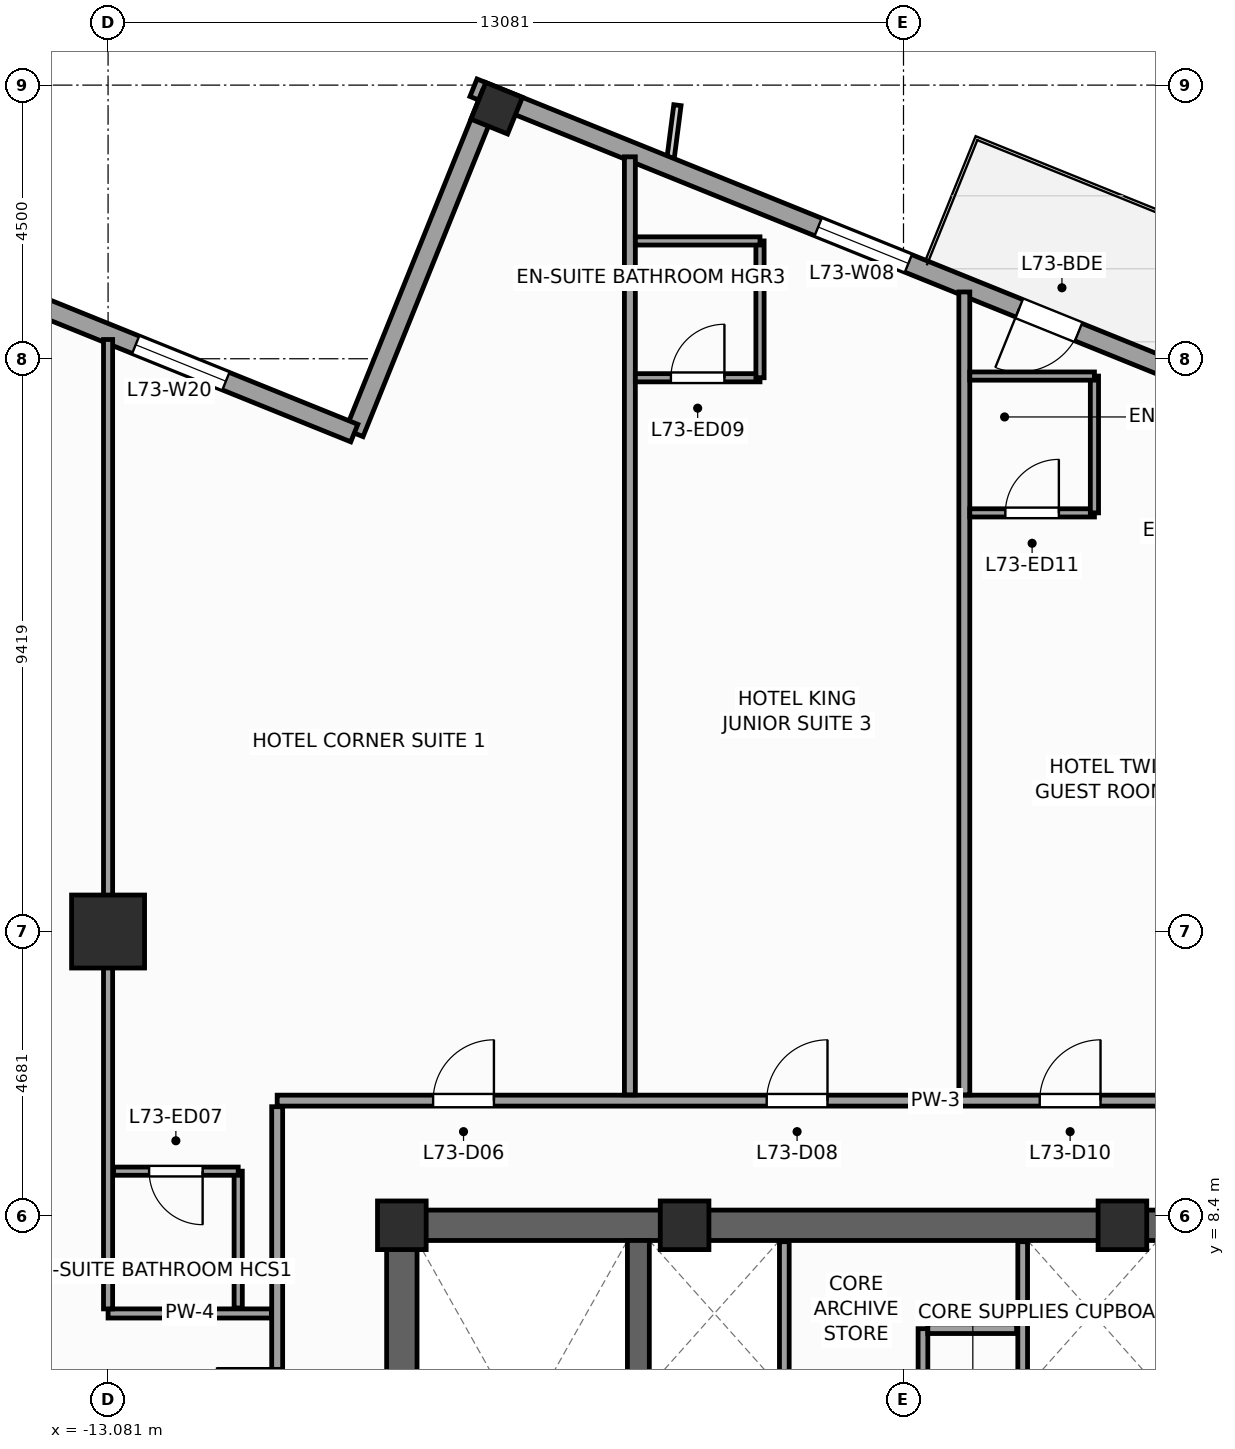
"""IFC4 building model, lengths in metres.
Left out: names, types, materials, properties, quantities, classifications, styles, units other than length and angle.
Written with IfcOpenShell. Run it as: python <this file> out.ifc"""

import sys

from ifc_helpers import new_model, si_unit, direction, frame, frame_2d, origin, origin_2d, place, context, subcontext, project, spatial, rectangle, extrude, source, transform, mapped, element, fill, save


model = new_model("IFC4")
c1 = context("Model", 3, precision=1e-05, world=origin(), true_north=direction((0.0, 1.0)))
c2 = subcontext(c1, "Body", "Model", "MODEL_VIEW")
j1 = project(units=[si_unit("LENGTHUNIT", "METRE"), si_unit("PLANEANGLEUNIT", "RADIAN")], contexts=[c1])
p1 = place(None, origin())
s1 = spatial("IfcSite", under=j1, at=p1, CompositionType="ELEMENT")
p2 = place(p1, origin())
s2 = spatial("IfcBuilding", under=s1, at=p2, CompositionType="ELEMENT")
p3 = place(p2, frame((0.0, 0.0, 297.6)))
s3 = spatial("IfcBuildingStorey", under=s2, at=p3, CompositionType="ELEMENT", Elevation=297.6)
p4 = place(p3, frame((-8.5, 8.25, 0.0), z_axis=(0.0, 0.0, 1.0), x_axis=(1.0, 0.0, 0.0)))
e1 = element("IfcWall", 1, at=p4, inside=s3, PredefinedType="SHEAR", context=c2, shape_type="SweptSolid", body=[
    extrude(rectangle(XDim=17.0, YDim=0.5, at=frame_2d((8.5, 0.0))), origin(), (0.0, 0.0, 1.0), 3.6),
])
p5 = place(p3, frame((-8.25, -8.0, 0.0), z_axis=(0.0, 0.0, 1.0), x_axis=(0.0, 1.0, 0.0)))
e2 = element("IfcWall", 2, at=p5, inside=s3, PredefinedType="SHEAR", context=c2, shape_type="SweptSolid", body=[
    extrude(rectangle(XDim=16.0, YDim=0.5, at=frame_2d((8.0, 0.0))), origin(), (0.0, 0.0, 1.0), 3.6),
])
p6 = place(p5, frame((4.69, 0.0, 0.0)))
e3 = element("IfcOpeningElement", 3, at=p6, cuts=e2, PredefinedType="OPENING", context=c2, shape_type="SweptSolid", body=[
    extrude(rectangle(XDim=1.3, YDim=2.2, at=frame_2d((0.65, 1.1))), frame((0.0, 0.26, 0.0), z_axis=(0.0, -1.0, 0.0), x_axis=(1.0, 0.0, 0.0)), (0.0, 0.0, 1.0), 0.52),
])
p7 = place(p3, frame((-4.36, -8.0, 0.0), z_axis=(0.0, 0.0, 1.0), x_axis=(0.0, 1.0, 0.0)))
e4 = element("IfcWall", 4, at=p7, inside=s3, PredefinedType="SHEAR", context=c2, shape_type="SweptSolid", body=[
    extrude(rectangle(XDim=16.0, YDim=0.36, at=frame_2d((8.0, 0.0))), origin(), (0.0, 0.0, 1.0), 3.6),
])
m1 = source(origin(), c2, "Body", "SweptSolid", [
    extrude(rectangle(XDim=0.8, YDim=0.8, at=origin_2d()), origin(), (0.0, 0.0, 1.0), 3.6),
])
for number, where, z_axis, x_axis in (
    (5, (-8.25, 8.25, 0.0), (0.0, 0.0, 1.0), (1.0, 0.0, 0.0)),
    (6, (-3.6, 8.25, 0.0), (0.0, 0.0, 1.0), (1.0, 0.0, 0.0)),
    (7, (3.6, 8.25, 0.0), (0.0, 0.0, 1.0), (1.0, 0.0, 0.0)),
):
    element("IfcColumn", number, at=place(p3, frame(where, z_axis=z_axis, x_axis=x_axis)), inside=s3, PredefinedType="PILASTER", context=c2, shape_type="MappedRepresentation", body=[
        mapped(m1, transform((0.0, 0.0, 0.0), scale=1.0)),
    ])
m2 = source(origin(), c2, "Body", "SweptSolid", [
    extrude(rectangle(XDim=1.2, YDim=1.2, at=origin_2d()), origin(), (0.0, 0.0, 1.0), 3.6),
])
p8 = place(p3, frame((-13.081, 13.081, 0.0), z_axis=(0.0, 0.0, 1.0), x_axis=(1.0, 0.0, 0.0)))
e8 = element("IfcColumn", 8, at=p8, inside=s3, PredefinedType="COLUMN", context=c2, shape_type="MappedRepresentation", body=[
    mapped(m2, transform((0.0, 0.0, 0.0), scale=1.0)),
])
m3 = source(origin(), c2, "Body", "SweptSolid", [
    extrude(rectangle(XDim=0.65, YDim=0.65, at=origin_2d()), origin(), (0.0, 0.0, 1.0), 3.6),
])
p9 = place(p3, frame((-6.69, 26.62, 0.0), z_axis=(0.0, 0.0, 1.0), x_axis=(0.374606593416, 0.927183854567, 0.0)))
e9 = element("IfcColumn", 9, at=p9, inside=s3, PredefinedType="COLUMN", context=c2, shape_type="MappedRepresentation", body=[
    mapped(m3, transform((0.0, 0.0, 0.0), scale=1.0)),
])
p10 = place(p3, frame((23.813, 14.479, 0.0), z_axis=(0.0, 0.0, 1.0), x_axis=(-0.927182657188, 0.374609557019, 0.0)))
e10 = element("IfcWall", 10, at=p10, inside=s3, PredefinedType="STANDARD", context=c2, shape_type="SweptSolid", body=[
    extrude(rectangle(XDim=33.31, YDim=0.31, at=frame_2d((16.655, 0.0))), origin(), (0.0, 0.0, 1.0), 2.75),
])
p11 = place(p10, frame((22.58, 0.0, 0.0)))
e11 = element("IfcOpeningElement", 11, at=p11, cuts=e10, PredefinedType="OPENING", context=c2, shape_type="SweptSolid", body=[
    extrude(rectangle(XDim=1.05, YDim=2.25, at=frame_2d((0.525, 1.125))), frame((0.0, 0.165, 0.0), z_axis=(0.0, -1.0, 0.0), x_axis=(1.0, 0.0, 0.0)), (0.0, 0.0, 1.0), 0.33),
])
p12 = place(p10, frame((3.197, 0.0, 0.47)))
e12 = element("IfcOpeningElement", 12, at=p12, cuts=e10, PredefinedType="OPENING", context=c2, shape_type="SweptSolid", body=[
    extrude(rectangle(XDim=1.6, YDim=2.1, at=frame_2d((0.8, 1.05))), frame((0.0, 0.165, 0.0), z_axis=(0.0, -1.0, 0.0), x_axis=(1.0, 0.0, 0.0)), (0.0, 0.0, 1.0), 0.33),
])
p13 = place(p10, frame((8.86, 0.0, 0.47)))
e13 = element("IfcOpeningElement", 13, at=p13, cuts=e10, PredefinedType="OPENING", context=c2, shape_type="SweptSolid", body=[
    extrude(rectangle(XDim=1.6, YDim=2.1, at=frame_2d((0.8, 1.05))), frame((0.0, 0.165, 0.0), z_axis=(0.0, -1.0, 0.0), x_axis=(1.0, 0.0, 0.0)), (0.0, 0.0, 1.0), 0.33),
])
p14 = place(p10, frame((14.439, 0.0, 0.47)))
e14 = element("IfcOpeningElement", 14, at=p14, cuts=e10, PredefinedType="OPENING", context=c2, shape_type="SweptSolid", body=[
    extrude(rectangle(XDim=1.6, YDim=2.1, at=frame_2d((0.8, 1.05))), frame((0.0, 0.165, 0.0), z_axis=(0.0, -1.0, 0.0), x_axis=(1.0, 0.0, 0.0)), (0.0, 0.0, 1.0), 0.33),
])
p15 = place(p10, frame((25.597, 0.0, 0.47)))
e15 = element("IfcOpeningElement", 15, at=p15, cuts=e10, PredefinedType="OPENING", context=c2, shape_type="SweptSolid", body=[
    extrude(rectangle(XDim=1.6, YDim=2.1, at=frame_2d((0.8, 1.05))), frame((0.0, 0.165, 0.0), z_axis=(0.0, -1.0, 0.0), x_axis=(1.0, 0.0, 0.0)), (0.0, 0.0, 1.0), 0.33),
])
p16 = place(p3, frame((-6.784, 26.841, 0.0), z_axis=(0.0, 0.0, 1.0), x_axis=(-0.374636620962, -0.927171722085, 0.0)))
e16 = element("IfcWall", 16, at=p16, inside=s3, PredefinedType="STANDARD", context=c2, shape_type="SweptSolid", body=[
    extrude(rectangle(XDim=6.0, YDim=0.31, at=frame_2d((3.0, 0.0))), origin(), (0.0, 0.0, 1.0), 2.65),
])
p17 = place(p3, frame((-9.032, 21.278, 0.0), z_axis=(0.0, 0.0, 1.0), x_axis=(-0.927185411764, 0.374602739196, 0.0)))
e17 = element("IfcWall", 17, at=p17, inside=s3, PredefinedType="STANDARD", context=c2, shape_type="SweptSolid", body=[
    extrude(rectangle(XDim=6.155, YDim=0.31, at=frame_2d((3.078, 0.0))), origin(), (0.0, 0.0, 1.0), 3.35),
])
p18 = place(p17, frame((2.278, 0.0, 0.47)))
e18 = element("IfcOpeningElement", 18, at=p18, cuts=e17, PredefinedType="OPENING", context=c2, shape_type="SweptSolid", body=[
    extrude(rectangle(XDim=1.6, YDim=2.1, at=frame_2d((0.8, 1.05))), frame((0.0, 0.165, 0.0), z_axis=(0.0, -1.0, 0.0), x_axis=(1.0, 0.0, 0.0)), (0.0, 0.0, 1.0), 0.33),
])
for number, where, z_axis, x_axis in (
    (19, (-1.96, 4.58, 0.0), (0.0, 0.0, 1.0), (0.0, 1.0, 0.0)),
    (20, (1.96, 4.58, 0.0), (0.0, 0.0, 1.0), (0.0, 1.0, 0.0)),
):
    element("IfcWall", number, at=place(p3, frame(where, z_axis=z_axis, x_axis=x_axis)), inside=s3, PredefinedType="PARTITIONING", context=c2, shape_type="SweptSolid", body=[
        extrude(rectangle(XDim=3.4, YDim=0.16, at=frame_2d((1.7, 0.0))), origin(), (0.0, 0.0, 1.0), 3.35),
    ])
p19 = place(p3, frame((0.32, 4.6, 0.0), z_axis=(0.0, 0.0, 1.0), x_axis=(0.0, 1.0, 0.0)))
e21 = element("IfcWall", 21, at=p19, inside=s3, PredefinedType="PARTITIONING", context=c2, shape_type="SweptSolid", body=[
    extrude(rectangle(XDim=1.95, YDim=0.16, at=frame_2d((0.975, 0.0))), origin(), (0.0, 0.0, 1.0), 3.35),
])
p20 = place(p3, frame((0.4, 6.55, 0.0), z_axis=(0.0, 0.0, 1.0), x_axis=(1.0, 0.0, 0.0)))
e22 = element("IfcWall", 22, at=p20, inside=s3, PredefinedType="PARTITIONING", context=c2, shape_type="SweptSolid", body=[
    extrude(rectangle(XDim=1.46, YDim=0.16, at=frame_2d((0.73, 0.0))), origin(), (0.0, 0.0, 1.0), 3.35),
])
p21 = place(p3, frame((-10.3, 10.3, 0.0), z_axis=(0.0, 0.0, 1.0), x_axis=(1.0, 0.0, 0.0)))
e23 = element("IfcWall", 23, at=p21, inside=s3, PredefinedType="PARTITIONING", context=c2, shape_type="SweptSolid", body=[
    extrude(rectangle(XDim=21.65, YDim=0.18, at=frame_2d((10.825, 0.0))), origin(), (0.0, 0.0, 1.0), 3.35),
])
p22 = place(p21, frame((2.564, 0.0, 0.0)))
e24 = element("IfcOpeningElement", 24, at=p22, cuts=e23, PredefinedType="OPENING", context=c2, shape_type="SweptSolid", body=[
    extrude(rectangle(XDim=1.0, YDim=2.15, at=frame_2d((0.5, 1.075))), frame((0.0, 0.1, 0.0), z_axis=(0.0, -1.0, 0.0), x_axis=(1.0, 0.0, 0.0)), (0.0, 0.0, 1.0), 0.2),
])
p23 = place(p21, frame((8.05, 0.0, 0.0)))
e25 = element("IfcOpeningElement", 25, at=p23, cuts=e23, PredefinedType="OPENING", context=c2, shape_type="SweptSolid", body=[
    extrude(rectangle(XDim=1.0, YDim=2.15, at=frame_2d((0.5, 1.075))), frame((0.0, 0.1, 0.0), z_axis=(0.0, -1.0, 0.0), x_axis=(1.0, 0.0, 0.0)), (0.0, 0.0, 1.0), 0.2),
])
p24 = place(p21, frame((12.54, 0.0, 0.0)))
e26 = element("IfcOpeningElement", 26, at=p24, cuts=e23, PredefinedType="OPENING", context=c2, shape_type="SweptSolid", body=[
    extrude(rectangle(XDim=1.0, YDim=2.15, at=frame_2d((0.5, 1.075))), frame((0.0, 0.1, 0.0), z_axis=(0.0, -1.0, 0.0), x_axis=(1.0, 0.0, 0.0)), (0.0, 0.0, 1.0), 0.2),
])
p25 = place(p21, frame((18.871, 0.0, 0.0)))
e27 = element("IfcOpeningElement", 27, at=p25, cuts=e23, PredefinedType="OPENING", context=c2, shape_type="SweptSolid", body=[
    extrude(rectangle(XDim=1.0, YDim=2.15, at=frame_2d((0.5, 1.075))), frame((0.0, 0.1, 0.0), z_axis=(0.0, -1.0, 0.0), x_axis=(1.0, 0.0, 0.0)), (0.0, 0.0, 1.0), 0.2),
])
p26 = place(p3, frame((-10.3, -12.35, 0.0), z_axis=(0.0, 0.0, 1.0), x_axis=(0.0, 1.0, 0.0)))
e28 = element("IfcWall", 28, at=p26, inside=s3, PredefinedType="PARTITIONING", context=c2, shape_type="SweptSolid", body=[
    extrude(rectangle(XDim=22.55, YDim=0.18, at=frame_2d((11.275, 0.0))), origin(), (0.0, 0.0, 1.0), 3.35),
])
p27 = place(p26, frame((13.95, 0.0, 0.0)))
e29 = element("IfcOpeningElement", 29, at=p27, cuts=e28, PredefinedType="OPENING", context=c2, shape_type="SweptSolid", body=[
    extrude(rectangle(XDim=1.0, YDim=2.15, at=frame_2d((0.5, 1.075))), frame((0.0, 0.1, 0.0), z_axis=(0.0, -1.0, 0.0), x_axis=(1.0, 0.0, 0.0)), (0.0, 0.0, 1.0), 0.2),
])
p28 = place(p26, frame((17.25, 0.0, 0.0)))
e30 = element("IfcOpeningElement", 30, at=p28, cuts=e28, PredefinedType="OPENING", context=c2, shape_type="SweptSolid", body=[
    extrude(rectangle(XDim=1.0, YDim=2.15, at=frame_2d((0.5, 1.075))), frame((0.0, 0.1, 0.0), z_axis=(0.0, -1.0, 0.0), x_axis=(1.0, 0.0, 0.0)), (0.0, 0.0, 1.0), 0.2),
])
p29 = place(p26, frame((6.65, 0.0, 0.0)))
e31 = element("IfcOpeningElement", 31, at=p29, cuts=e28, PredefinedType="OPENING", context=c2, shape_type="SweptSolid", body=[
    extrude(rectangle(XDim=1.0, YDim=2.15, at=frame_2d((0.5, 1.075))), frame((0.0, 0.1, 0.0), z_axis=(0.0, -1.0, 0.0), x_axis=(1.0, 0.0, 0.0)), (0.0, 0.0, 1.0), 0.2),
])
p30 = place(p26, frame((10.15, 0.0, 0.0)))
e32 = element("IfcOpeningElement", 32, at=p30, cuts=e28, PredefinedType="OPENING", context=c2, shape_type="SweptSolid", body=[
    extrude(rectangle(XDim=1.0, YDim=2.15, at=frame_2d((0.5, 1.075))), frame((0.0, 0.1, 0.0), z_axis=(0.0, -1.0, 0.0), x_axis=(1.0, 0.0, 0.0)), (0.0, 0.0, 1.0), 0.2),
])
p31 = place(p3, frame((-4.5, 10.395, 0.0), z_axis=(0.0, 0.0, 1.0), x_axis=(0.0, 1.0, 0.0)))
e33 = element("IfcWall", 33, at=p31, inside=s3, PredefinedType="PARTITIONING", context=c2, shape_type="SweptSolid", body=[
    extrude(rectangle(XDim=15.426, YDim=0.18, at=frame_2d((7.713, 0.0))), origin(), (0.0, 0.0, 1.0), 3.35),
])
p32 = place(p3, frame((1.0, 10.395, 0.0), z_axis=(0.0, 0.0, 1.0), x_axis=(0.0, 1.0, 0.0)))
e34 = element("IfcWall", 34, at=p32, inside=s3, PredefinedType="PARTITIONING", context=c2, shape_type="SweptSolid", body=[
    extrude(rectangle(XDim=13.204, YDim=0.18, at=frame_2d((6.602, 0.0))), origin(), (0.0, 0.0, 1.0), 3.35),
])
p33 = place(p3, frame((-10.395, 6.8, 0.0), z_axis=(0.0, 0.0, 1.0), x_axis=(-1.0, 0.0, 0.0)))
e35 = element("IfcWall", 35, at=p33, inside=s3, PredefinedType="PARTITIONING", context=c2, shape_type="SweptSolid", body=[
    extrude(rectangle(XDim=2.686, YDim=0.15, at=frame_2d((1.343, 0.0))), origin(), (0.0, 0.0, 1.0), 3.35),
])
p34 = place(p3, frame((-13.081, 6.875, 0.0), z_axis=(0.0, 0.0, 1.0), x_axis=(0.0, 1.0, 0.0)))
e36 = element("IfcWall", 36, at=p34, inside=s3, PredefinedType="PARTITIONING", context=c2, shape_type="SweptSolid", body=[
    extrude(rectangle(XDim=15.942, YDim=0.15, at=frame_2d((7.971, 0.0))), origin(), (0.0, 0.0, 1.0), 2.45),
])
p35 = place(p3, frame((-10.941, 6.89, 0.0), z_axis=(0.0, 0.0, 1.0), x_axis=(0.0, 1.0, 0.0)))
e37 = element("IfcWall", 37, at=p35, inside=s3, PredefinedType="PARTITIONING", context=c2, shape_type="SweptSolid", body=[
    extrude(rectangle(XDim=2.25, YDim=0.135, at=frame_2d((1.125, 0.0))), origin(), (0.0, 0.0, 1.0), 3.35),
])
p36 = place(p3, frame((-12.991, 9.14, 0.0), z_axis=(0.0, 0.0, 1.0), x_axis=(1.0, 0.0, 0.0)))
e38 = element("IfcWall", 38, at=p36, inside=s3, PredefinedType="PARTITIONING", context=c2, shape_type="SweptSolid", body=[
    extrude(rectangle(XDim=2.05, YDim=0.135, at=frame_2d((1.025, 0.0))), origin(), (0.0, 0.0, 1.0), 3.35),
])
p37 = place(p36, frame((0.585, 0.0, 0.0)))
e39 = element("IfcOpeningElement", 39, at=p37, cuts=e38, PredefinedType="OPENING", context=c2, shape_type="SweptSolid", body=[
    extrude(rectangle(XDim=0.88, YDim=2.1, at=frame_2d((0.44, 1.05))), frame((0.0, 0.078, 0.0), z_axis=(0.0, -1.0, 0.0), x_axis=(1.0, 0.0, 0.0)), (0.0, 0.0, 1.0), 0.155),
])
p38 = place(p3, frame((-4.41, 22.188, 0.0), z_axis=(0.0, 0.0, 1.0), x_axis=(1.0, 0.0, 0.0)))
e40 = element("IfcWall", 40, at=p38, inside=s3, PredefinedType="PARTITIONING", context=c2, shape_type="SweptSolid", body=[
    extrude(rectangle(XDim=2.05, YDim=0.135, at=frame_2d((1.025, 0.0))), origin(), (0.0, 0.0, 1.0), 3.35),
])
p39 = place(p38, frame((0.585, 0.0, 0.0)))
e41 = element("IfcOpeningElement", 41, at=p39, cuts=e40, PredefinedType="OPENING", context=c2, shape_type="SweptSolid", body=[
    extrude(rectangle(XDim=0.88, YDim=2.1, at=frame_2d((0.44, 1.05))), frame((0.0, 0.078, 0.0), z_axis=(0.0, -1.0, 0.0), x_axis=(1.0, 0.0, 0.0)), (0.0, 0.0, 1.0), 0.155),
])
p40 = place(p3, frame((-2.36, 22.188, 0.0), z_axis=(0.0, 0.0, 1.0), x_axis=(0.0, 1.0, 0.0)))
e42 = element("IfcWall", 42, at=p40, inside=s3, PredefinedType="PARTITIONING", context=c2, shape_type="SweptSolid", body=[
    extrude(rectangle(XDim=2.25, YDim=0.135, at=frame_2d((1.125, 0.0))), origin(), (0.0, 0.0, 1.0), 3.35),
])
p41 = place(p3, frame((-4.41, 24.438, 0.0), z_axis=(0.0, 0.0, 1.0), x_axis=(1.0, 0.0, 0.0)))
e43 = element("IfcWall", 43, at=p41, inside=s3, PredefinedType="PARTITIONING", context=c2, shape_type="SweptSolid", body=[
    extrude(rectangle(XDim=2.05, YDim=0.135, at=frame_2d((1.025, 0.0))), origin(), (0.0, 0.0, 1.0), 3.35),
])
p42 = place(p3, frame((1.09, 19.965, 0.0), z_axis=(0.0, 0.0, 1.0), x_axis=(1.0, 0.0, 0.0)))
e44 = element("IfcWall", 44, at=p42, inside=s3, PredefinedType="PARTITIONING", context=c2, shape_type="SweptSolid", body=[
    extrude(rectangle(XDim=2.05, YDim=0.135, at=frame_2d((1.025, 0.0))), origin(), (0.0, 0.0, 1.0), 3.35),
])
p43 = place(p42, frame((0.585, 0.0, 0.0)))
e45 = element("IfcOpeningElement", 45, at=p43, cuts=e44, PredefinedType="OPENING", context=c2, shape_type="SweptSolid", body=[
    extrude(rectangle(XDim=0.88, YDim=2.1, at=frame_2d((0.44, 1.05))), frame((0.0, 0.078, 0.0), z_axis=(0.0, -1.0, 0.0), x_axis=(1.0, 0.0, 0.0)), (0.0, 0.0, 1.0), 0.155),
])
p44 = place(p3, frame((3.14, 19.965, 0.0), z_axis=(0.0, 0.0, 1.0), x_axis=(0.0, 1.0, 0.0)))
e46 = element("IfcWall", 46, at=p44, inside=s3, PredefinedType="PARTITIONING", context=c2, shape_type="SweptSolid", body=[
    extrude(rectangle(XDim=2.25, YDim=0.135, at=frame_2d((1.125, 0.0))), origin(), (0.0, 0.0, 1.0), 3.35),
])
p45 = place(p3, frame((1.09, 22.215, 0.0), z_axis=(0.0, 0.0, 1.0), x_axis=(1.0, 0.0, 0.0)))
e47 = element("IfcWall", 47, at=p45, inside=s3, PredefinedType="PARTITIONING", context=c2, shape_type="SweptSolid", body=[
    extrude(rectangle(XDim=2.05, YDim=0.135, at=frame_2d((1.025, 0.0))), origin(), (0.0, 0.0, 1.0), 3.35),
])
m4 = source(origin(), c2, "Body", "SweptSolid", [
    extrude(rectangle(XDim=1.05, YDim=2.25, at=frame_2d((0.525, 1.125))), frame((0.0, 0.025, 0.0), z_axis=(0.0, -1.0, 0.0), x_axis=(1.0, 0.0, 0.0)), (0.0, 0.0, 1.0), 0.05),
])
p46 = place(p11, origin())
e48 = element("IfcDoor", 48, at=p46, inside=s3, OperationType="SINGLE_SWING_RIGHT", PredefinedType="DOOR", context=c2, shape_type="MappedRepresentation", body=[
    mapped(m4, transform((0.0, 0.0, 0.0), scale=1.0)),
])
fill(e11, e48)
m5 = source(origin(), c2, "Body", "SweptSolid", [
    extrude(rectangle(XDim=1.6, YDim=2.1, at=frame_2d((0.8, 1.05))), frame((0.0, 0.03, 0.0), z_axis=(0.0, -1.0, 0.0), x_axis=(1.0, 0.0, 0.0)), (0.0, 0.0, 1.0), 0.06),
])
p47 = place(p15, origin())
e49 = element("IfcWindow", 49, at=p47, inside=s3, PartitioningType="SINGLE_PANEL", PredefinedType="WINDOW", context=c2, shape_type="MappedRepresentation", body=[
    mapped(m5, transform((0.0, 0.0, 0.0), scale=1.0)),
])
fill(e15, e49)
p48 = place(p18, origin())
e50 = element("IfcWindow", 50, at=p48, inside=s3, PartitioningType="SINGLE_PANEL", PredefinedType="WINDOW", context=c2, shape_type="MappedRepresentation", body=[
    mapped(m5, transform((0.0, 0.0, 0.0), scale=1.0)),
])
fill(e18, e50)
m6 = source(origin(), c2, "Body", "SweptSolid", [
    extrude(rectangle(XDim=1.0, YDim=2.15, at=frame_2d((0.5, 1.075))), frame((0.0, 0.025, 0.0), z_axis=(0.0, -1.0, 0.0), x_axis=(1.0, 0.0, 0.0)), (0.0, 0.0, 1.0), 0.05),
])
p49 = place(p28, origin())
e51 = element("IfcDoor", 51, at=p49, inside=s3, OperationType="SINGLE_SWING_RIGHT", PredefinedType="DOOR", context=c2, shape_type="MappedRepresentation", body=[
    mapped(m6, transform((0.0, 0.0, 0.0), scale=1.0)),
])
fill(e30, e51)
p50 = place(p22, origin())
e52 = element("IfcDoor", 52, at=p50, inside=s3, OperationType="SINGLE_SWING_RIGHT", PredefinedType="DOOR", context=c2, shape_type="MappedRepresentation", body=[
    mapped(m6, transform((0.0, 0.0, 0.0), scale=1.0)),
])
fill(e24, e52)
m7 = source(origin(), c2, "Body", "SweptSolid", [
    extrude(rectangle(XDim=0.88, YDim=2.1, at=frame_2d((0.44, 1.05))), frame((0.0, 0.025, 0.0), z_axis=(0.0, -1.0, 0.0), x_axis=(1.0, 0.0, 0.0)), (0.0, 0.0, 1.0), 0.05),
])
p51 = place(p37, frame((0.88, 0.0, 0.0), z_axis=(0.0, 0.0, 1.0), x_axis=(-1.0, 0.0, 0.0)))
e53 = element("IfcDoor", 53, at=p51, inside=s3, OperationType="SINGLE_SWING_RIGHT", PredefinedType="DOOR", context=c2, shape_type="MappedRepresentation", body=[
    mapped(m7, transform((0.0, 0.0, 0.0), scale=1.0)),
])
fill(e39, e53)
p52 = place(p23, origin())
e54 = element("IfcDoor", 54, at=p52, inside=s3, OperationType="SINGLE_SWING_RIGHT", PredefinedType="DOOR", context=c2, shape_type="MappedRepresentation", body=[
    mapped(m6, transform((0.0, 0.0, 0.0), scale=1.0)),
])
fill(e25, e54)
p53 = place(p39, origin())
e55 = element("IfcDoor", 55, at=p53, inside=s3, OperationType="SINGLE_SWING_RIGHT", PredefinedType="DOOR", context=c2, shape_type="MappedRepresentation", body=[
    mapped(m7, transform((0.0, 0.0, 0.0), scale=1.0)),
])
fill(e41, e55)
p54 = place(p24, origin())
e56 = element("IfcDoor", 56, at=p54, inside=s3, OperationType="SINGLE_SWING_RIGHT", PredefinedType="DOOR", context=c2, shape_type="MappedRepresentation", body=[
    mapped(m6, transform((0.0, 0.0, 0.0), scale=1.0)),
])
fill(e26, e56)
p55 = place(p43, origin())
e57 = element("IfcDoor", 57, at=p55, inside=s3, OperationType="SINGLE_SWING_RIGHT", PredefinedType="DOOR", context=c2, shape_type="MappedRepresentation", body=[
    mapped(m7, transform((0.0, 0.0, 0.0), scale=1.0)),
])
fill(e45, e57)
save(model, sys.argv[1])
